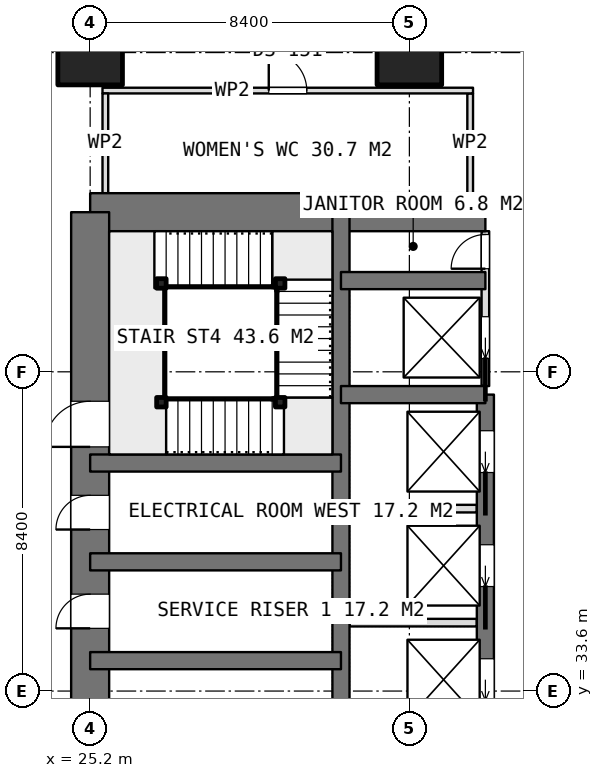
"""IFC4 building model, lengths in metres.
Left out: names, types, materials, properties, quantities, classifications, styles, units other than length and angle.
Written with IfcOpenShell. Run it as: python <this file> out.ifc"""

import sys

from ifc_helpers import new_model, si_unit, direction, frame, frame_2d, origin, origin_2d, place, context, subcontext, project, spatial, rectangle, extrude, element, fill, save


model = new_model("IFC4")
c1 = context("Model", 3, precision=1e-05, world=origin(), true_north=direction((0.0, 1.0)))
c2 = subcontext(c1, "Body", "Model", "MODEL_VIEW")
j1 = project(units=[si_unit("LENGTHUNIT", "METRE"), si_unit("PLANEANGLEUNIT", "RADIAN")], contexts=[c1])
p1 = place(None, origin())
s1 = spatial("IfcSite", under=j1, at=p1, CompositionType="ELEMENT")
p2 = place(p1, origin())
s2 = spatial("IfcBuilding", under=s1, at=p2, CompositionType="ELEMENT")
p3 = place(p2, frame((0.0, 0.0, 140.3)))
s3 = spatial("IfcBuildingStorey", under=s2, at=p3, CompositionType="ELEMENT", Elevation=140.3)
p4 = place(p3, frame((25.2, 46.2, 0.0), z_axis=(0.0, 0.0, 1.0), x_axis=(1.0, 0.0, 0.0)))
e1 = element("IfcWall", 1, at=p4, inside=s3, PredefinedType="SHEAR", context=c2, shape_type="SweptSolid", body=[
    extrude(rectangle(XDim=10.4, YDim=1.0, at=frame_2d((5.2, 0.0))), origin(), (0.0, 0.0, 1.0), 3.75),
])
p5 = place(p3, frame((25.2, 21.0, 0.0), z_axis=(0.0, 0.0, 1.0), x_axis=(0.0, 1.0, 0.0)))
e2 = element("IfcWall", 2, at=p5, inside=s3, PredefinedType="SHEAR", context=c2, shape_type="SweptSolid", body=[
    extrude(rectangle(XDim=25.2, YDim=1.0, at=frame_2d((12.6, 0.0))), origin(), (0.0, 0.0, 1.0), 3.75),
])
p6 = place(p5, frame((7.8, 0.0, 0.0)))
e3 = element("IfcOpeningElement", 3, at=p6, cuts=e2, PredefinedType="OPENING", context=c2, shape_type="SweptSolid", body=[
    extrude(rectangle(XDim=1.2, YDim=2.1, at=frame_2d((0.6, 1.05))), frame((0.0, 0.51, 0.0), z_axis=(0.0, -1.0, 0.0), x_axis=(1.0, 0.0, 0.0)), (0.0, 0.0, 1.0), 1.02),
])
p7 = place(p5, frame((14.25, 0.0, 0.0)))
e4 = element("IfcOpeningElement", 4, at=p7, cuts=e2, PredefinedType="OPENING", context=c2, shape_type="SweptSolid", body=[
    extrude(rectangle(XDim=0.9, YDim=2.1, at=frame_2d((0.45, 1.05))), frame((0.0, 0.51, 0.0), z_axis=(0.0, -1.0, 0.0), x_axis=(1.0, 0.0, 0.0)), (0.0, 0.0, 1.0), 1.02),
])
p8 = place(p5, frame((16.85, 0.0, 0.0)))
e5 = element("IfcOpeningElement", 5, at=p8, cuts=e2, PredefinedType="OPENING", context=c2, shape_type="SweptSolid", body=[
    extrude(rectangle(XDim=0.9, YDim=2.1, at=frame_2d((0.45, 1.05))), frame((0.0, 0.51, 0.0), z_axis=(0.0, -1.0, 0.0), x_axis=(1.0, 0.0, 0.0)), (0.0, 0.0, 1.0), 1.02),
])
p9 = place(p5, frame((19.025, 0.0, 0.0)))
e6 = element("IfcOpeningElement", 6, at=p9, cuts=e2, PredefinedType="OPENING", context=c2, shape_type="SweptSolid", body=[
    extrude(rectangle(XDim=1.2, YDim=2.1, at=frame_2d((0.6, 1.05))), frame((0.0, 0.51, 0.0), z_axis=(0.0, -1.0, 0.0), x_axis=(1.0, 0.0, 0.0)), (0.0, 0.0, 1.0), 1.02),
])
p10 = place(p3, frame((31.8, 21.0, 0.0), z_axis=(0.0, 0.0, 1.0), x_axis=(0.0, 1.0, 0.0)))
e7 = element("IfcWall", 7, at=p10, inside=s3, PredefinedType="SHEAR", context=c2, shape_type="SweptSolid", body=[
    extrude(rectangle(XDim=25.2, YDim=0.45, at=frame_2d((12.6, 0.0))), origin(), (0.0, 0.0, 1.0), 3.75),
])
p11 = place(p3, frame((35.6, 23.4, 0.0), z_axis=(0.0, 0.0, 1.0), x_axis=(0.0, 1.0, 0.0)))
e8 = element("IfcWall", 8, at=p11, inside=s3, PredefinedType="SHEAR", context=c2, shape_type="SweptSolid", body=[
    extrude(rectangle(XDim=18.0, YDim=0.45, at=frame_2d((9.0, 0.0))), origin(), (0.0, 0.0, 1.0), 3.75),
])
p12 = place(p11, frame((0.95, 0.0, 0.0)))
e9 = element("IfcOpeningElement", 9, at=p12, cuts=e8, PredefinedType="OPENING", context=c2, shape_type="SweptSolid", body=[
    extrude(rectangle(XDim=1.1, YDim=2.1, at=frame_2d((0.55, 1.05))), frame((0.0, 0.235, 0.0), z_axis=(0.0, -1.0, 0.0), x_axis=(1.0, 0.0, 0.0)), (0.0, 0.0, 1.0), 0.47),
])
p13 = place(p11, frame((3.95, 0.0, 0.0)))
e10 = element("IfcOpeningElement", 10, at=p13, cuts=e8, PredefinedType="OPENING", context=c2, shape_type="SweptSolid", body=[
    extrude(rectangle(XDim=1.1, YDim=2.1, at=frame_2d((0.55, 1.05))), frame((0.0, 0.235, 0.0), z_axis=(0.0, -1.0, 0.0), x_axis=(1.0, 0.0, 0.0)), (0.0, 0.0, 1.0), 0.47),
])
p14 = place(p11, frame((6.95, 0.0, 0.0)))
e11 = element("IfcOpeningElement", 11, at=p14, cuts=e8, PredefinedType="OPENING", context=c2, shape_type="SweptSolid", body=[
    extrude(rectangle(XDim=1.1, YDim=2.1, at=frame_2d((0.55, 1.05))), frame((0.0, 0.235, 0.0), z_axis=(0.0, -1.0, 0.0), x_axis=(1.0, 0.0, 0.0)), (0.0, 0.0, 1.0), 0.47),
])
p15 = place(p11, frame((9.95, 0.0, 0.0)))
e12 = element("IfcOpeningElement", 12, at=p15, cuts=e8, PredefinedType="OPENING", context=c2, shape_type="SweptSolid", body=[
    extrude(rectangle(XDim=1.1, YDim=2.1, at=frame_2d((0.55, 1.05))), frame((0.0, 0.235, 0.0), z_axis=(0.0, -1.0, 0.0), x_axis=(1.0, 0.0, 0.0)), (0.0, 0.0, 1.0), 0.47),
])
p16 = place(p11, frame((12.95, 0.0, 0.0)))
e13 = element("IfcOpeningElement", 13, at=p16, cuts=e8, PredefinedType="OPENING", context=c2, shape_type="SweptSolid", body=[
    extrude(rectangle(XDim=1.1, YDim=2.1, at=frame_2d((0.55, 1.05))), frame((0.0, 0.235, 0.0), z_axis=(0.0, -1.0, 0.0), x_axis=(1.0, 0.0, 0.0)), (0.0, 0.0, 1.0), 0.47),
])
p17 = place(p11, frame((15.95, 0.0, 0.0)))
e14 = element("IfcOpeningElement", 14, at=p17, cuts=e8, PredefinedType="OPENING", context=c2, shape_type="SweptSolid", body=[
    extrude(rectangle(XDim=1.1, YDim=2.1, at=frame_2d((0.55, 1.05))), frame((0.0, 0.235, 0.0), z_axis=(0.0, -1.0, 0.0), x_axis=(1.0, 0.0, 0.0)), (0.0, 0.0, 1.0), 0.47),
])
for number, where, z_axis, x_axis in (
    (15, (31.8, 41.4, 0.0), (0.0, 0.0, 1.0), (1.0, 0.0, 0.0)),
    (16, (31.8, 44.4, 0.0), (0.0, 0.0, 1.0), (1.0, 0.0, 0.0)),
):
    element("IfcWall", number, at=place(p3, frame(where, z_axis=z_axis, x_axis=x_axis)), inside=s3, PredefinedType="SHEAR", context=c2, shape_type="SweptSolid", body=[
        extrude(rectangle(XDim=3.8, YDim=0.45, at=frame_2d((1.9, 0.0))), origin(), (0.0, 0.0, 1.0), 3.75),
    ])
for number, where, z_axis, x_axis in (
    (17, (25.2, 34.4, 0.0), (0.0, 0.0, 1.0), (1.0, 0.0, 0.0)),
    (18, (25.2, 37.0, 0.0), (0.0, 0.0, 1.0), (1.0, 0.0, 0.0)),
    (19, (25.2, 39.6, 0.0), (0.0, 0.0, 1.0), (1.0, 0.0, 0.0)),
):
    element("IfcWall", number, at=place(p3, frame(where, z_axis=z_axis, x_axis=x_axis)), inside=s3, PredefinedType="SHEAR", context=c2, shape_type="SweptSolid", body=[
        extrude(rectangle(XDim=6.6, YDim=0.45, at=frame_2d((3.3, 0.0))), origin(), (0.0, 0.0, 1.0), 3.75),
    ])
for number, where, z_axis, x_axis in (
    (20, (25.2, 50.4, 0.0), (0.0, 0.0, 1.0), (1.0, 0.0, 0.0)),
    (21, (33.6, 50.4, 0.0), (0.0, 0.0, 1.0), (1.0, 0.0, 0.0)),
):
    element("IfcColumn", number, at=place(p3, frame(where, z_axis=z_axis, x_axis=x_axis)), inside=s3, PredefinedType="COLUMN", context=c2, shape_type="SweptSolid", body=[
        extrude(rectangle(XDim=1.7, YDim=1.7, at=origin_2d()), origin(), (0.0, 0.0, 1.0), 3.75),
    ])
for number, where, z_axis, x_axis in (
    (22, (32.025, 35.4, 0.0), (0.0, 0.0, 1.0), (1.0, 0.0, 0.0)),
    (23, (32.025, 38.4, 0.0), (0.0, 0.0, 1.0), (1.0, 0.0, 0.0)),
):
    element("IfcWall", number, at=place(p3, frame(where, z_axis=z_axis, x_axis=x_axis)), inside=s3, PredefinedType="PARTITIONING", context=c2, shape_type="SweptSolid", body=[
        extrude(rectangle(XDim=3.35, YDim=0.2, at=frame_2d((1.675, 0.0))), origin(), (0.0, 0.0, 1.0), 3.5),
    ])
p18 = place(p3, frame((35.6, 41.625, 0.0), z_axis=(0.0, 0.0, 1.0), x_axis=(0.0, 1.0, 0.0)))
e24 = element("IfcWall", 24, at=p18, inside=s3, PredefinedType="PARTITIONING", context=c2, shape_type="SweptSolid", body=[
    extrude(rectangle(XDim=4.075, YDim=0.2, at=frame_2d((2.038, 0.0))), origin(), (0.0, 0.0, 1.0), 3.5),
])
p19 = place(p18, frame((3.088, 0.0, 0.0)))
e25 = element("IfcOpeningElement", 25, at=p19, cuts=e24, PredefinedType="OPENING", context=c2, shape_type="SweptSolid", body=[
    extrude(rectangle(XDim=0.9, YDim=2.1, at=frame_2d((0.45, 1.05))), frame((0.0, 0.11, 0.0), z_axis=(0.0, -1.0, 0.0), x_axis=(1.0, 0.0, 0.0)), (0.0, 0.0, 1.0), 0.22),
])
p20 = place(p18, frame((0.725, 0.0, 0.0)))
e26 = element("IfcOpeningElement", 26, at=p20, cuts=e24, PredefinedType="OPENING", context=c2, shape_type="SweptSolid", body=[
    extrude(rectangle(XDim=1.1, YDim=2.1, at=frame_2d((0.55, 1.05))), frame((0.0, 0.11, 0.0), z_axis=(0.0, -1.0, 0.0), x_axis=(1.0, 0.0, 0.0)), (0.0, 0.0, 1.0), 0.22),
])
p21 = place(p3, frame((25.525, 49.4, 0.0), z_axis=(0.0, 0.0, 1.0), x_axis=(1.0, 0.0, 0.0)))
e27 = element("IfcWall", 27, at=p21, inside=s3, PredefinedType="PARTITIONING", context=c2, shape_type="SweptSolid", body=[
    extrude(rectangle(XDim=9.75, YDim=0.15, at=frame_2d((4.875, 0.0))), origin(), (0.0, 0.0, 1.0), 3.5),
])
p22 = place(p21, frame((4.375, 0.0, 0.0)))
e28 = element("IfcOpeningElement", 28, at=p22, cuts=e27, PredefinedType="OPENING", context=c2, shape_type="SweptSolid", body=[
    extrude(rectangle(XDim=1.0, YDim=2.1, at=frame_2d((0.5, 1.05))), frame((0.0, 0.085, 0.0), z_axis=(0.0, -1.0, 0.0), x_axis=(1.0, 0.0, 0.0)), (0.0, 0.0, 1.0), 0.17),
])
for number, where, z_axis, x_axis in (
    (29, (25.6, 46.7, 0.0), (0.0, 0.0, 1.0), (0.0, 1.0, 0.0)),
    (30, (35.2, 46.7, 0.0), (0.0, 0.0, 1.0), (0.0, 1.0, 0.0)),
):
    element("IfcWall", number, at=place(p3, frame(where, z_axis=z_axis, x_axis=x_axis)), inside=s3, PredefinedType="PARTITIONING", context=c2, shape_type="SweptSolid", body=[
        extrude(rectangle(XDim=2.625, YDim=0.15, at=frame_2d((1.312, 0.0))), origin(), (0.0, 0.0, 1.0), 3.5),
    ])
for number, where, z_axis, x_axis in (
    (31, (27.075, 41.2, 0.0), (0.0, 0.0, 1.0), (1.0, 0.0, 0.0)),
    (32, (30.2, 41.2, 0.0), (0.0, 0.0, 1.0), (1.0, 0.0, 0.0)),
    (33, (30.2, 44.325, 0.0), (0.0, 0.0, 1.0), (1.0, 0.0, 0.0)),
    (34, (27.075, 44.325, 0.0), (0.0, 0.0, 1.0), (1.0, 0.0, 0.0)),
):
    element("IfcColumn", number, at=place(p3, frame(where, z_axis=z_axis, x_axis=x_axis)), inside=s3, PredefinedType="COLUMN", context=c2, shape_type="SweptSolid", body=[
        extrude(rectangle(XDim=0.25, YDim=0.25, at=origin_2d()), origin(), (0.0, 0.0, 1.0), 3.75),
    ])
p23 = place(p7, origin())
e35 = element("IfcDoor", 35, at=p23, inside=s3, OperationType="SINGLE_SWING_LEFT", PredefinedType="DOOR", context=c2, shape_type="SweptSolid", body=[
    extrude(rectangle(XDim=0.9, YDim=2.1, at=frame_2d((0.45, 1.05))), frame((0.0, 0.025, 0.0), z_axis=(0.0, -1.0, 0.0), x_axis=(1.0, 0.0, 0.0)), (0.0, 0.0, 1.0), 0.05),
])
fill(e4, e35)
p24 = place(p8, origin())
e36 = element("IfcDoor", 36, at=p24, inside=s3, OperationType="SINGLE_SWING_LEFT", PredefinedType="DOOR", context=c2, shape_type="SweptSolid", body=[
    extrude(rectangle(XDim=0.9, YDim=2.1, at=frame_2d((0.45, 1.05))), frame((0.0, 0.025, 0.0), z_axis=(0.0, -1.0, 0.0), x_axis=(1.0, 0.0, 0.0)), (0.0, 0.0, 1.0), 0.05),
])
fill(e5, e36)
p25 = place(p19, origin())
e37 = element("IfcDoor", 37, at=p25, inside=s3, OperationType="SINGLE_SWING_LEFT", PredefinedType="DOOR", context=c2, shape_type="SweptSolid", body=[
    extrude(rectangle(XDim=0.9, YDim=2.1, at=frame_2d((0.45, 1.05))), frame((0.0, 0.025, 0.0), z_axis=(0.0, -1.0, 0.0), x_axis=(1.0, 0.0, 0.0)), (0.0, 0.0, 1.0), 0.05),
])
fill(e25, e37)
p26 = place(p15, origin())
e38 = element("IfcDoor", 38, at=p26, inside=s3, OperationType="SLIDING_TO_LEFT", PredefinedType="USERDEFINED", context=c2, shape_type="SweptSolid", body=[
    extrude(rectangle(XDim=1.1, YDim=2.1, at=frame_2d((0.55, 1.05))), frame((0.0, 0.025, 0.0), z_axis=(0.0, -1.0, 0.0), x_axis=(1.0, 0.0, 0.0)), (0.0, 0.0, 1.0), 0.05),
])
fill(e12, e38)
p27 = place(p16, origin())
e39 = element("IfcDoor", 39, at=p27, inside=s3, OperationType="SLIDING_TO_LEFT", PredefinedType="USERDEFINED", context=c2, shape_type="SweptSolid", body=[
    extrude(rectangle(XDim=1.1, YDim=2.1, at=frame_2d((0.55, 1.05))), frame((0.0, 0.025, 0.0), z_axis=(0.0, -1.0, 0.0), x_axis=(1.0, 0.0, 0.0)), (0.0, 0.0, 1.0), 0.05),
])
fill(e13, e39)
p28 = place(p17, origin())
e40 = element("IfcDoor", 40, at=p28, inside=s3, OperationType="SLIDING_TO_LEFT", PredefinedType="USERDEFINED", context=c2, shape_type="SweptSolid", body=[
    extrude(rectangle(XDim=1.1, YDim=2.1, at=frame_2d((0.55, 1.05))), frame((0.0, 0.025, 0.0), z_axis=(0.0, -1.0, 0.0), x_axis=(1.0, 0.0, 0.0)), (0.0, 0.0, 1.0), 0.05),
])
fill(e14, e40)
p29 = place(p20, origin())
e41 = element("IfcDoor", 41, at=p29, inside=s3, OperationType="SLIDING_TO_LEFT", PredefinedType="USERDEFINED", context=c2, shape_type="SweptSolid", body=[
    extrude(rectangle(XDim=1.1, YDim=2.1, at=frame_2d((0.55, 1.05))), frame((0.0, 0.025, 0.0), z_axis=(0.0, -1.0, 0.0), x_axis=(1.0, 0.0, 0.0)), (0.0, 0.0, 1.0), 0.05),
])
fill(e26, e41)
p30 = place(p22, origin())
e42 = element("IfcDoor", 42, at=p30, inside=s3, OperationType="SINGLE_SWING_LEFT", PredefinedType="DOOR", context=c2, shape_type="SweptSolid", body=[
    extrude(rectangle(XDim=1.0, YDim=2.1, at=frame_2d((0.5, 1.05))), frame((0.0, 0.025, 0.0), z_axis=(0.0, -1.0, 0.0), x_axis=(1.0, 0.0, 0.0)), (0.0, 0.0, 1.0), 0.05),
])
fill(e28, e42)
p31 = place(p9, origin())
e43 = element("IfcDoor", 43, at=p31, inside=s3, OperationType="SINGLE_SWING_RIGHT", PredefinedType="DOOR", context=c2, shape_type="SweptSolid", body=[
    extrude(rectangle(XDim=1.2, YDim=2.1, at=frame_2d((0.6, 1.05))), frame((0.0, 0.025, 0.0), z_axis=(0.0, -1.0, 0.0), x_axis=(1.0, 0.0, 0.0)), (0.0, 0.0, 1.0), 0.05),
])
fill(e6, e43)
save(model, sys.argv[1])
